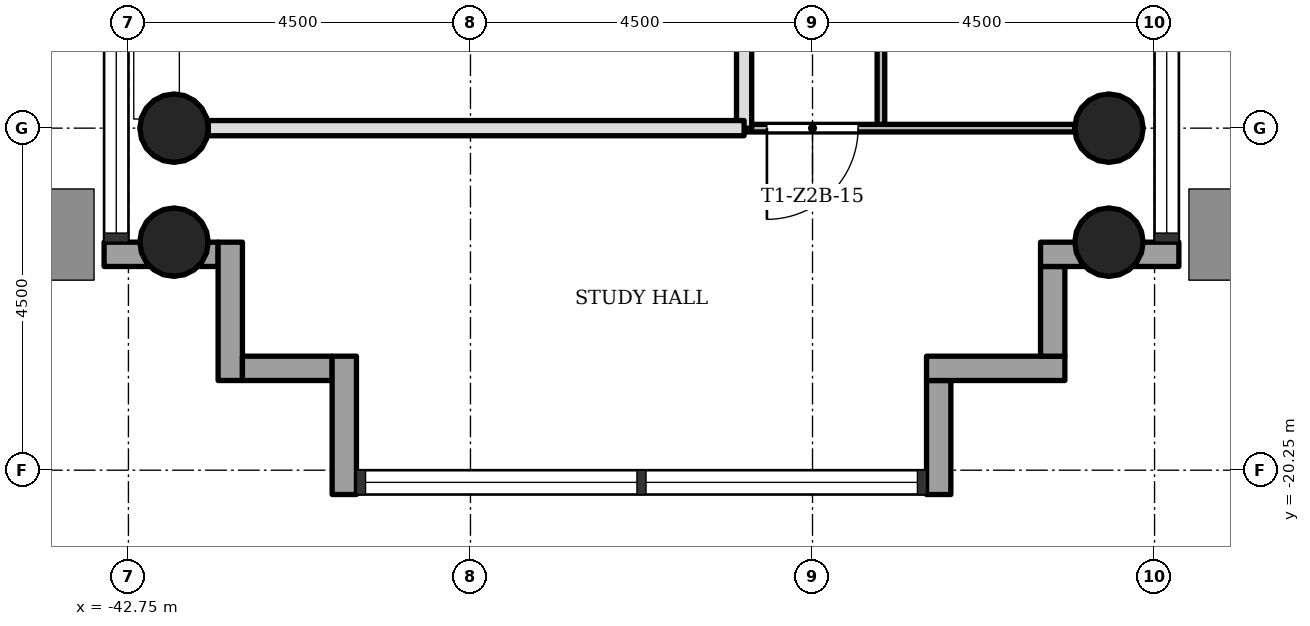
"""IFC4 building model, lengths in metres.
Left out: names, types, materials, properties, quantities, classifications, styles, units other than length and angle.
Written with IfcOpenShell. Run it as: python <this file> out.ifc"""

import sys

from ifc_helpers import new_model, si_unit, direction, frame, frame_2d, origin, origin_2d, place, context, subcontext, project, spatial, rectangle, hollow_circle, extrude, element, fill, save


model = new_model("IFC4")
c1 = context("Model", 3, precision=1e-05, world=origin(), true_north=direction((0.0, 1.0)))
c2 = subcontext(c1, "Body", "Model", "MODEL_VIEW")
j1 = project(units=[si_unit("LENGTHUNIT", "METRE"), si_unit("PLANEANGLEUNIT", "RADIAN")], contexts=[c1])
p1 = place(None, origin())
s1 = spatial("IfcSite", under=j1, at=p1, CompositionType="ELEMENT")
p2 = place(p1, origin())
s2 = spatial("IfcBuilding", under=s1, at=p2, CompositionType="ELEMENT")
p3 = place(p2, frame((0.0, 0.0, 80.0)))
s3 = spatial("IfcBuildingStorey", under=s2, at=p3, CompositionType="ELEMENT", Elevation=80.0)
for number, where, z_axis, x_axis in (
    (1, (-42.15, -15.75, 0.0), (0.0, 0.0, 1.0), (1.0, 0.0, 0.0)),
    (2, (-29.85, -15.75, 0.0), (0.0, 0.0, 1.0), (1.0, 0.0, 0.0)),
    (3, (-42.15, -17.25, 0.0), (0.0, 0.0, 1.0), (1.0, 0.0, 0.0)),
    (4, (-29.85, -17.25, 0.0), (0.0, 0.0, 1.0), (1.0, 0.0, 0.0)),
):
    element("IfcColumn", number, at=place(p3, frame(where, z_axis=z_axis, x_axis=x_axis)), inside=s3, PredefinedType="COLUMN", context=c2, shape_type="SweptSolid", body=[
        extrude(hollow_circle(Radius=0.45, WallThickness=0.032, at=origin_2d()), origin(), (0.0, 0.0, 1.0), 3.4),
    ])
p4 = place(p3, frame((-43.07, -17.41, -0.3), z_axis=(0.0, 0.0, 1.0), x_axis=(1.0, 0.0, 0.0)))
e5 = element("IfcWall", 5, at=p4, inside=s3, PredefinedType="STANDARD", context=c2, shape_type="SweptSolid", body=[
    extrude(rectangle(XDim=1.5, YDim=0.32, at=frame_2d((0.75, 0.0))), origin(), (0.0, 0.0, 1.0), 3.4),
])
p5 = place(p3, frame((-41.41, -17.25, -0.3), z_axis=(0.0, 0.0, 1.0), x_axis=(0.0, -1.0, 0.0)))
e6 = element("IfcWall", 6, at=p5, inside=s3, PredefinedType="STANDARD", context=c2, shape_type="SweptSolid", body=[
    extrude(rectangle(XDim=1.82, YDim=0.32, at=frame_2d((0.91, 0.0))), origin(), (0.0, 0.0, 1.0), 3.4),
])
p6 = place(p3, frame((-41.25, -18.91, -0.3), z_axis=(0.0, 0.0, 1.0), x_axis=(1.0, 0.0, 0.0)))
e7 = element("IfcWall", 7, at=p6, inside=s3, PredefinedType="STANDARD", context=c2, shape_type="SweptSolid", body=[
    extrude(rectangle(XDim=1.18, YDim=0.32, at=frame_2d((0.59, 0.0))), origin(), (0.0, 0.0, 1.0), 3.4),
])
p7 = place(p3, frame((-39.91, -18.75, -0.3), z_axis=(0.0, 0.0, 1.0), x_axis=(0.0, -1.0, 0.0)))
e8 = element("IfcWall", 8, at=p7, inside=s3, PredefinedType="STANDARD", context=c2, shape_type="SweptSolid", body=[
    extrude(rectangle(XDim=1.82, YDim=0.32, at=frame_2d((0.91, 0.0))), origin(), (0.0, 0.0, 1.0), 3.4),
])
p8 = place(p3, frame((-32.09, -20.57, -0.3), z_axis=(0.0, 0.0, 1.0), x_axis=(0.0, 1.0, 0.0)))
e9 = element("IfcWall", 9, at=p8, inside=s3, PredefinedType="STANDARD", context=c2, shape_type="SweptSolid", body=[
    extrude(rectangle(XDim=1.5, YDim=0.32, at=frame_2d((0.75, 0.0))), origin(), (0.0, 0.0, 1.0), 3.4),
])
p9 = place(p3, frame((-32.25, -18.91, -0.3), z_axis=(0.0, 0.0, 1.0), x_axis=(1.0, 0.0, 0.0)))
e10 = element("IfcWall", 10, at=p9, inside=s3, PredefinedType="STANDARD", context=c2, shape_type="SweptSolid", body=[
    extrude(rectangle(XDim=1.82, YDim=0.32, at=frame_2d((0.91, 0.0))), origin(), (0.0, 0.0, 1.0), 3.4),
])
p10 = place(p3, frame((-30.59, -18.75, -0.3), z_axis=(0.0, 0.0, 1.0), x_axis=(0.0, 1.0, 0.0)))
e11 = element("IfcWall", 11, at=p10, inside=s3, PredefinedType="STANDARD", context=c2, shape_type="SweptSolid", body=[
    extrude(rectangle(XDim=1.18, YDim=0.32, at=frame_2d((0.59, 0.0))), origin(), (0.0, 0.0, 1.0), 3.4),
])
p11 = place(p3, frame((-30.75, -17.41, -0.3), z_axis=(0.0, 0.0, 1.0), x_axis=(1.0, 0.0, 0.0)))
e12 = element("IfcWall", 12, at=p11, inside=s3, PredefinedType="STANDARD", context=c2, shape_type="SweptSolid", body=[
    extrude(rectangle(XDim=1.82, YDim=0.32, at=frame_2d((0.91, 0.0))), origin(), (0.0, 0.0, 1.0), 3.4),
])
p12 = place(p3, frame((-34.65, -15.75, 0.0), z_axis=(0.0, 0.0, 1.0), x_axis=(0.0, 1.0, 0.0)))
e13 = element("IfcWall", 13, at=p12, inside=s3, PredefinedType="SOLIDWALL", context=c2, shape_type="SweptSolid", body=[
    extrude(rectangle(XDim=7.2, YDim=0.2, at=frame_2d((3.6, 0.0))), origin(), (0.0, 0.0, 1.0), 3.0),
])
p13 = place(p12, frame((1.95, 0.0, 0.0)))
e14 = element("IfcOpeningElement", 14, at=p13, cuts=e13, PredefinedType="OPENING", context=c2, shape_type="SweptSolid", body=[
    extrude(rectangle(XDim=0.9, YDim=2.1, at=frame_2d((0.45, 1.05))), frame((0.0, 0.11, 0.0), z_axis=(0.0, -1.0, 0.0), x_axis=(1.0, 0.0, 0.0)), (0.0, 0.0, 1.0), 0.22),
])
p14 = place(p3, frame((-32.85, -15.75, 0.0), z_axis=(0.0, 0.0, 1.0), x_axis=(0.0, 1.0, 0.0)))
e15 = element("IfcWall", 15, at=p14, inside=s3, PredefinedType="PARTITIONING", context=c2, shape_type="SweptSolid", body=[
    extrude(rectangle(XDim=9.0, YDim=0.1, at=frame_2d((4.5, 0.0))), origin(), (0.0, 0.0, 1.0), 3.0),
])
p15 = place(p14, frame((5.55, 0.0, 0.0)))
e16 = element("IfcOpeningElement", 16, at=p15, cuts=e15, PredefinedType="OPENING", context=c2, shape_type="SweptSolid", body=[
    extrude(rectangle(XDim=0.9, YDim=2.1, at=frame_2d((0.45, 1.05))), frame((0.0, 0.06, 0.0), z_axis=(0.0, -1.0, 0.0), x_axis=(1.0, 0.0, 0.0)), (0.0, 0.0, 1.0), 0.12),
])
p16 = place(p3, frame((-34.65, -15.75, 0.0), z_axis=(0.0, 0.0, 1.0), x_axis=(1.0, 0.0, 0.0)))
e17 = element("IfcWall", 17, at=p16, inside=s3, PredefinedType="PARTITIONING", context=c2, shape_type="SweptSolid", body=[
    extrude(rectangle(XDim=4.35, YDim=0.1, at=frame_2d((2.175, 0.0))), origin(), (0.0, 0.0, 1.0), 3.0),
])
p17 = place(p16, frame((0.3, 0.0, 0.0)))
e18 = element("IfcOpeningElement", 18, at=p17, cuts=e17, PredefinedType="OPENING", context=c2, shape_type="SweptSolid", body=[
    extrude(rectangle(XDim=1.2, YDim=2.1, at=frame_2d((0.6, 1.05))), frame((0.0, 0.06, 0.0), z_axis=(0.0, -1.0, 0.0), x_axis=(1.0, 0.0, 0.0)), (0.0, 0.0, 1.0), 0.12),
])
p18 = place(p3, frame((-41.7, -15.75, 0.0), z_axis=(0.0, 0.0, 1.0), x_axis=(1.0, 0.0, 0.0)))
e19 = element("IfcWall", 19, at=p18, inside=s3, PredefinedType="SOLIDWALL", context=c2, shape_type="SweptSolid", body=[
    extrude(rectangle(XDim=7.05, YDim=0.2, at=frame_2d((3.525, 0.0))), origin(), (0.0, 0.0, 1.0), 3.0),
])
p19 = place(p17, origin())
e20 = element("IfcDoor", 20, at=p19, inside=s3, OperationType="SINGLE_SWING_LEFT", PredefinedType="DOOR", context=c2, shape_type="SweptSolid", body=[
    extrude(rectangle(XDim=1.2, YDim=2.1, at=frame_2d((0.6, 1.05))), frame((0.0, 0.025, 0.0), z_axis=(0.0, -1.0, 0.0), x_axis=(1.0, 0.0, 0.0)), (0.0, 0.0, 1.0), 0.05),
])
fill(e18, e20)
save(model, sys.argv[1])
